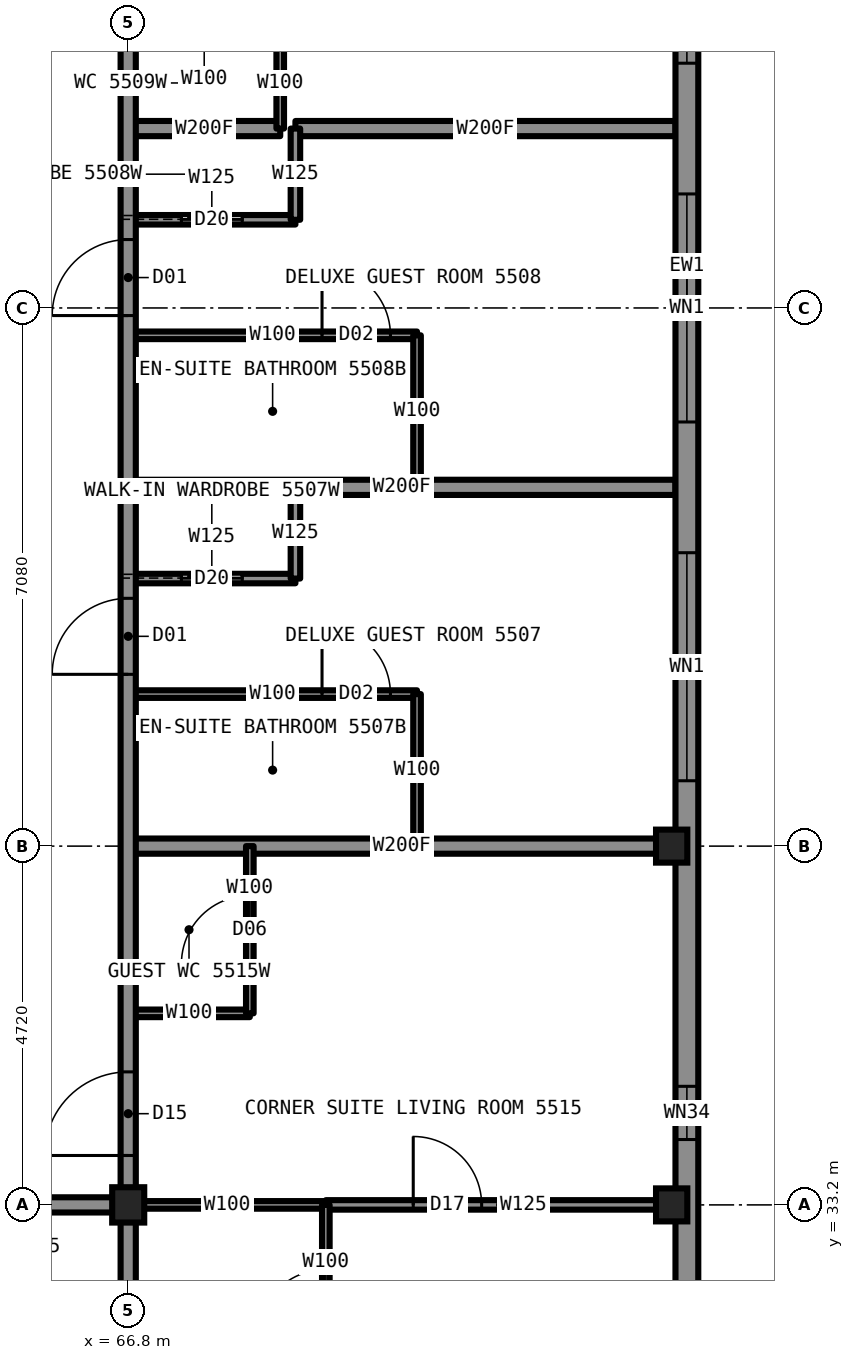
"""IFC4 building model, lengths in metres.
Left out: names, types, materials, properties, quantities, classifications, styles, units other than length and angle.
Written with IfcOpenShell. Run it as: python <this file> out.ifc"""

import sys

from ifc_helpers import new_model, si_unit, direction, frame, frame_2d, origin, origin_2d, place, context, subcontext, project, spatial, rectangle, i_section, extrude, element, fill, save


model = new_model("IFC4")
c1 = context("Model", 3, precision=1e-05, world=origin(), true_north=direction((0.0, 1.0)))
c2 = subcontext(c1, "Body", "Model", "MODEL_VIEW")
j1 = project(units=[si_unit("LENGTHUNIT", "METRE"), si_unit("PLANEANGLEUNIT", "RADIAN")], contexts=[c1])
p1 = place(None, origin())
s1 = spatial("IfcSite", under=j1, at=p1, CompositionType="ELEMENT")
p2 = place(p1, origin())
s2 = spatial("IfcBuilding", under=s1, at=p2, CompositionType="ELEMENT")
p3 = place(p2, frame((0.0, 0.0, 203.8)))
s3 = spatial("IfcBuildingStorey", under=s2, at=p3, CompositionType="ELEMENT", Elevation=203.8)
for number, where, z_axis, x_axis in (
    (1, (73.95, 33.2, 0.0), (0.0, 0.0, 1.0), (1.0, 0.0, 0.0)),
    (2, (73.95, 37.92, 0.0), (0.0, 0.0, 1.0), (1.0, 0.0, 0.0)),
):
    element("IfcColumn", number, at=place(p3, frame(where, z_axis=z_axis, x_axis=x_axis)), inside=s3, PredefinedType="COLUMN", context=c2, shape_type="SweptSolid", body=[
        extrude(i_section(OverallWidth=0.411, OverallDepth=0.434, WebThickness=0.036, FlangeThickness=0.057, at=origin_2d()), origin(), (0.0, 0.0, 1.0), 3.5),
    ])
p4 = place(p3, frame((66.8, 33.2, 0.0), z_axis=(0.0, 0.0, 1.0), x_axis=(1.0, 0.0, 0.0)))
e3 = element("IfcColumn", 3, at=p4, inside=s3, PredefinedType="COLUMN", context=c2, shape_type="SweptSolid", body=[
    extrude(i_section(OverallWidth=0.422, OverallDepth=0.465, WebThickness=0.045, FlangeThickness=0.073, at=origin_2d()), origin(), (0.0, 0.0, 1.0), 3.5),
])
p5 = place(p3, frame((66.8, 44.64, 0.0), z_axis=(0.0, 0.0, 1.0), x_axis=(1.0, 0.0, 0.0)))
e4 = element("IfcWall", 4, at=p5, inside=s3, PredefinedType="PARTITIONING", context=c2, shape_type="SweptSolid", body=[
    extrude(rectangle(XDim=3.8, YDim=0.1, at=frame_2d((1.9, 0.0))), origin(), (0.0, 0.0, 1.0), 3.33),
])
p6 = place(p5, frame((2.55, 0.0, 0.0)))
e5 = element("IfcOpeningElement", 5, at=p6, cuts=e4, PredefinedType="OPENING", context=c2, shape_type="SweptSolid", body=[
    extrude(rectangle(XDim=0.9, YDim=2.1, at=frame_2d((0.45, 1.05))), frame((0.0, 0.06, 0.0), z_axis=(0.0, -1.0, 0.0), x_axis=(1.0, 0.0, 0.0)), (0.0, 0.0, 1.0), 0.12),
])
p7 = place(p3, frame((66.8, 33.2, 0.0), z_axis=(0.0, 0.0, 1.0), x_axis=(1.0, 0.0, 0.0)))
e6 = element("IfcWall", 6, at=p7, inside=s3, PredefinedType="PARTITIONING", context=c2, shape_type="SweptSolid", body=[
    extrude(rectangle(XDim=2.6, YDim=0.1, at=frame_2d((1.3, 0.0))), origin(), (0.0, 0.0, 1.0), 2.573),
])
p8 = place(p3, frame((43.2, 33.2, 0.0), z_axis=(0.0, 0.0, 1.0), x_axis=(1.0, 0.0, 0.0)))
e7 = element("IfcWall", 7, at=p8, inside=s3, PredefinedType="PARTITIONING", context=c2, shape_type="SweptSolid", body=[
    extrude(rectangle(XDim=23.6, YDim=0.2, at=frame_2d((11.8, 0.0))), origin(), (0.0, 0.0, 1.0), 3.33),
])
p9 = place(p8, frame((2.55, 0.0, 0.0)))
e8 = element("IfcOpeningElement", 8, at=p9, cuts=e7, PredefinedType="OPENING", context=c2, shape_type="SweptSolid", body=[
    extrude(rectangle(XDim=1.0, YDim=2.2, at=frame_2d((0.5, 1.1))), frame((0.0, 0.11, 0.0), z_axis=(0.0, -1.0, 0.0), x_axis=(1.0, 0.0, 0.0)), (0.0, 0.0, 1.0), 0.22),
])
p10 = place(p8, frame((6.57, 0.0, 0.0)))
e9 = element("IfcOpeningElement", 9, at=p10, cuts=e7, PredefinedType="OPENING", context=c2, shape_type="SweptSolid", body=[
    extrude(rectangle(XDim=1.1, YDim=2.2, at=frame_2d((0.55, 1.1))), frame((0.0, 0.11, 0.0), z_axis=(0.0, -1.0, 0.0), x_axis=(1.0, 0.0, 0.0)), (0.0, 0.0, 1.0), 0.22),
])
p11 = place(p8, frame((21.14, 0.0, 0.0)))
e10 = element("IfcOpeningElement", 10, at=p11, cuts=e7, PredefinedType="OPENING", context=c2, shape_type="SweptSolid", body=[
    extrude(rectangle(XDim=1.0, YDim=2.2, at=frame_2d((0.5, 1.1))), frame((0.0, 0.11, 0.0), z_axis=(0.0, -1.0, 0.0), x_axis=(1.0, 0.0, 0.0)), (0.0, 0.0, 1.0), 0.22),
])
p12 = place(p3, frame((69.4, 33.2, 0.0), z_axis=(0.0, 0.0, 1.0), x_axis=(1.0, 0.0, 0.0)))
e11 = element("IfcWall", 11, at=p12, inside=s3, PredefinedType="PARTITIONING", context=c2, shape_type="SweptSolid", body=[
    extrude(rectangle(XDim=4.6, YDim=0.125, at=frame_2d((2.3, 0.0))), origin(), (0.0, 0.0, 1.0), 2.573),
])
p13 = place(p12, frame((1.15, 0.0, 0.0)))
e12 = element("IfcOpeningElement", 12, at=p13, cuts=e11, PredefinedType="OPENING", context=c2, shape_type="SweptSolid", body=[
    extrude(rectangle(XDim=0.9, YDim=2.2, at=frame_2d((0.45, 1.1))), frame((0.0, 0.073, 0.0), z_axis=(0.0, -1.0, 0.0), x_axis=(1.0, 0.0, 0.0)), (0.0, 0.0, 1.0), 0.145),
])
p14 = place(p3, frame((66.8, 42.64, 0.0), z_axis=(0.0, 0.0, 1.0), x_axis=(1.0, 0.0, 0.0)))
e13 = element("IfcWall", 13, at=p14, inside=s3, PredefinedType="PARTITIONING", context=c2, shape_type="SweptSolid", body=[
    extrude(rectangle(XDim=7.2, YDim=0.2, at=frame_2d((3.6, 0.0))), origin(), (0.0, 0.0, 1.0), 2.73),
])
p15 = place(p3, frame((66.8, 41.44, 0.0), z_axis=(0.0, 0.0, 1.0), x_axis=(1.0, 0.0, 0.0)))
e14 = element("IfcWall", 14, at=p15, inside=s3, PredefinedType="PARTITIONING", context=c2, shape_type="SweptSolid", body=[
    extrude(rectangle(XDim=2.2, YDim=0.125, at=frame_2d((1.1, 0.0))), origin(), (0.0, 0.0, 1.0), 3.33),
])
p16 = place(p15, frame((0.7, 0.0, 0.0)))
e15 = element("IfcOpeningElement", 15, at=p16, cuts=e14, PredefinedType="OPENING", context=c2, shape_type="SweptSolid", body=[
    extrude(rectangle(XDim=0.8, YDim=2.1, at=frame_2d((0.4, 1.05))), frame((0.0, 0.073, 0.0), z_axis=(0.0, -1.0, 0.0), x_axis=(1.0, 0.0, 0.0)), (0.0, 0.0, 1.0), 0.145),
])
p17 = place(p3, frame((66.8, 39.92, 0.0), z_axis=(0.0, 0.0, 1.0), x_axis=(1.0, 0.0, 0.0)))
e16 = element("IfcWall", 16, at=p17, inside=s3, PredefinedType="PARTITIONING", context=c2, shape_type="SweptSolid", body=[
    extrude(rectangle(XDim=3.8, YDim=0.1, at=frame_2d((1.9, 0.0))), origin(), (0.0, 0.0, 1.0), 3.33),
])
p18 = place(p17, frame((2.55, 0.0, 0.0)))
e17 = element("IfcOpeningElement", 17, at=p18, cuts=e16, PredefinedType="OPENING", context=c2, shape_type="SweptSolid", body=[
    extrude(rectangle(XDim=0.9, YDim=2.1, at=frame_2d((0.45, 1.05))), frame((0.0, 0.06, 0.0), z_axis=(0.0, -1.0, 0.0), x_axis=(1.0, 0.0, 0.0)), (0.0, 0.0, 1.0), 0.12),
])
p19 = place(p3, frame((66.8, 37.92, 0.0), z_axis=(0.0, 0.0, 1.0), x_axis=(1.0, 0.0, 0.0)))
e18 = element("IfcWall", 18, at=p19, inside=s3, PredefinedType="PARTITIONING", context=c2, shape_type="SweptSolid", body=[
    extrude(rectangle(XDim=7.2, YDim=0.2, at=frame_2d((3.6, 0.0))), origin(), (0.0, 0.0, 1.0), 2.573),
])
p20 = place(p3, frame((66.8, 35.72, 0.0), z_axis=(0.0, 0.0, 1.0), x_axis=(1.0, 0.0, 0.0)))
e19 = element("IfcWall", 19, at=p20, inside=s3, PredefinedType="PARTITIONING", context=c2, shape_type="SweptSolid", body=[
    extrude(rectangle(XDim=1.6, YDim=0.1, at=frame_2d((0.8, 0.0))), origin(), (0.0, 0.0, 1.0), 3.33),
])
p21 = place(p3, frame((66.8, 46.16, 0.0), z_axis=(0.0, 0.0, 1.0), x_axis=(1.0, 0.0, 0.0)))
e20 = element("IfcWall", 20, at=p21, inside=s3, PredefinedType="PARTITIONING", context=c2, shape_type="SweptSolid", body=[
    extrude(rectangle(XDim=2.2, YDim=0.125, at=frame_2d((1.1, 0.0))), origin(), (0.0, 0.0, 1.0), 3.33),
])
p22 = place(p21, frame((0.7, 0.0, 0.0)))
e21 = element("IfcOpeningElement", 21, at=p22, cuts=e20, PredefinedType="OPENING", context=c2, shape_type="SweptSolid", body=[
    extrude(rectangle(XDim=0.8, YDim=2.1, at=frame_2d((0.4, 1.05))), frame((0.0, 0.073, 0.0), z_axis=(0.0, -1.0, 0.0), x_axis=(1.0, 0.0, 0.0)), (0.0, 0.0, 1.0), 0.145),
])
p23 = place(p3, frame((66.8, 47.36, 0.0), z_axis=(0.0, 0.0, 1.0), x_axis=(1.0, 0.0, 0.0)))
e22 = element("IfcWall", 22, at=p23, inside=s3, PredefinedType="PARTITIONING", context=c2, shape_type="SweptSolid", body=[
    extrude(rectangle(XDim=2.0, YDim=0.2, at=frame_2d((1.0, 0.0))), origin(), (0.0, 0.0, 1.0), 2.73),
])
p24 = place(p3, frame((69.0, 47.36, 0.0), z_axis=(0.0, 0.0, 1.0), x_axis=(1.0, 0.0, 0.0)))
e23 = element("IfcWall", 23, at=p24, inside=s3, PredefinedType="PARTITIONING", context=c2, shape_type="SweptSolid", body=[
    extrude(rectangle(XDim=5.0, YDim=0.2, at=frame_2d((2.5, 0.0))), origin(), (0.0, 0.0, 1.0), 2.73),
])
p25 = place(p3, frame((66.8, 33.2, 0.0), z_axis=(0.0, 0.0, 1.0), x_axis=(0.0, 1.0, 0.0)))
e24 = element("IfcWall", 24, at=p25, inside=s3, PredefinedType="PARTITIONING", context=c2, shape_type="SweptSolid", body=[
    extrude(rectangle(XDim=23.58, YDim=0.2, at=frame_2d((11.79, 0.0))), origin(), (0.0, 0.0, 1.0), 3.33),
])
p26 = place(p25, frame((6.98, 0.0, 0.0)))
e25 = element("IfcOpeningElement", 25, at=p26, cuts=e24, PredefinedType="OPENING", context=c2, shape_type="SweptSolid", body=[
    extrude(rectangle(XDim=1.0, YDim=2.2, at=frame_2d((0.5, 1.1))), frame((0.0, 0.11, 0.0), z_axis=(0.0, -1.0, 0.0), x_axis=(1.0, 0.0, 0.0)), (0.0, 0.0, 1.0), 0.22),
])
p27 = place(p25, frame((11.7, 0.0, 0.0)))
e26 = element("IfcOpeningElement", 26, at=p27, cuts=e24, PredefinedType="OPENING", context=c2, shape_type="SweptSolid", body=[
    extrude(rectangle(XDim=1.0, YDim=2.2, at=frame_2d((0.5, 1.1))), frame((0.0, 0.11, 0.0), z_axis=(0.0, -1.0, 0.0), x_axis=(1.0, 0.0, 0.0)), (0.0, 0.0, 1.0), 0.22),
])
p28 = place(p25, frame((15.62, 0.0, 0.0)))
e27 = element("IfcOpeningElement", 27, at=p28, cuts=e24, PredefinedType="OPENING", context=c2, shape_type="SweptSolid", body=[
    extrude(rectangle(XDim=1.0, YDim=2.2, at=frame_2d((0.5, 1.1))), frame((0.0, 0.11, 0.0), z_axis=(0.0, -1.0, 0.0), x_axis=(1.0, 0.0, 0.0)), (0.0, 0.0, 1.0), 0.22),
])
p29 = place(p25, frame((22.05, 0.0, 0.0)))
e28 = element("IfcOpeningElement", 28, at=p29, cuts=e24, PredefinedType="OPENING", context=c2, shape_type="SweptSolid", body=[
    extrude(rectangle(XDim=1.1, YDim=2.2, at=frame_2d((0.55, 1.1))), frame((0.0, 0.11, 0.0), z_axis=(0.0, -1.0, 0.0), x_axis=(1.0, 0.0, 0.0)), (0.0, 0.0, 1.0), 0.22),
])
p30 = place(p25, frame((0.65, 0.0, 0.0)))
e29 = element("IfcOpeningElement", 29, at=p30, cuts=e24, PredefinedType="OPENING", context=c2, shape_type="SweptSolid", body=[
    extrude(rectangle(XDim=1.1, YDim=2.2, at=frame_2d((0.55, 1.1))), frame((0.0, 0.11, 0.0), z_axis=(0.0, -1.0, 0.0), x_axis=(1.0, 0.0, 0.0)), (0.0, 0.0, 1.0), 0.22),
])
p31 = place(p3, frame((66.8, 26.0, 0.0), z_axis=(0.0, 0.0, 1.0), x_axis=(0.0, 1.0, 0.0)))
e30 = element("IfcWall", 30, at=p31, inside=s3, PredefinedType="PARTITIONING", context=c2, shape_type="SweptSolid", body=[
    extrude(rectangle(XDim=7.2, YDim=0.2, at=frame_2d((3.6, 0.0))), origin(), (0.0, 0.0, 1.0), 2.573),
])
p32 = place(p3, frame((68.4, 35.72, 0.0), z_axis=(0.0, 0.0, 1.0), x_axis=(0.0, 1.0, 0.0)))
e31 = element("IfcWall", 31, at=p32, inside=s3, PredefinedType="PARTITIONING", context=c2, shape_type="SweptSolid", body=[
    extrude(rectangle(XDim=2.2, YDim=0.1, at=frame_2d((1.1, 0.0))), origin(), (0.0, 0.0, 1.0), 3.33),
])
p33 = place(p32, frame((0.65, 0.0, 0.0)))
e32 = element("IfcOpeningElement", 32, at=p33, cuts=e31, PredefinedType="OPENING", context=c2, shape_type="SweptSolid", body=[
    extrude(rectangle(XDim=0.9, YDim=2.1, at=frame_2d((0.45, 1.05))), frame((0.0, 0.06, 0.0), z_axis=(0.0, -1.0, 0.0), x_axis=(1.0, 0.0, 0.0)), (0.0, 0.0, 1.0), 0.12),
])
p34 = place(p3, frame((68.8, 47.36, 0.0), z_axis=(0.0, 0.0, 1.0), x_axis=(0.0, 1.0, 0.0)))
e33 = element("IfcWall", 33, at=p34, inside=s3, PredefinedType="PARTITIONING", context=c2, shape_type="SweptSolid", body=[
    extrude(rectangle(XDim=1.2, YDim=0.1, at=frame_2d((0.6, 0.0))), origin(), (0.0, 0.0, 1.0), 3.33),
])
p35 = place(p3, frame((69.0, 41.44, 0.0), z_axis=(0.0, 0.0, 1.0), x_axis=(0.0, 1.0, 0.0)))
e34 = element("IfcWall", 34, at=p35, inside=s3, PredefinedType="PARTITIONING", context=c2, shape_type="SweptSolid", body=[
    extrude(rectangle(XDim=1.2, YDim=0.125, at=frame_2d((0.6, 0.0))), origin(), (0.0, 0.0, 1.0), 3.33),
])
p36 = place(p3, frame((69.0, 46.16, 0.0), z_axis=(0.0, 0.0, 1.0), x_axis=(0.0, 1.0, 0.0)))
e35 = element("IfcWall", 35, at=p36, inside=s3, PredefinedType="PARTITIONING", context=c2, shape_type="SweptSolid", body=[
    extrude(rectangle(XDim=1.2, YDim=0.125, at=frame_2d((0.6, 0.0))), origin(), (0.0, 0.0, 1.0), 3.33),
])
p37 = place(p3, frame((69.4, 30.6, 0.0), z_axis=(0.0, 0.0, 1.0), x_axis=(0.0, 1.0, 0.0)))
e36 = element("IfcWall", 36, at=p37, inside=s3, PredefinedType="PARTITIONING", context=c2, shape_type="SweptSolid", body=[
    extrude(rectangle(XDim=2.6, YDim=0.1, at=frame_2d((1.3, 0.0))), origin(), (0.0, 0.0, 1.0), 3.33),
])
p38 = place(p37, frame((0.85, 0.0, 0.0)))
e37 = element("IfcOpeningElement", 37, at=p38, cuts=e36, PredefinedType="OPENING", context=c2, shape_type="SweptSolid", body=[
    extrude(rectangle(XDim=0.9, YDim=2.1, at=frame_2d((0.45, 1.05))), frame((0.0, 0.06, 0.0), z_axis=(0.0, -1.0, 0.0), x_axis=(1.0, 0.0, 0.0)), (0.0, 0.0, 1.0), 0.12),
])
for number, where, z_axis, x_axis in (
    (38, (70.6, 37.92, 0.0), (0.0, 0.0, 1.0), (0.0, 1.0, 0.0)),
    (39, (70.6, 42.64, 0.0), (0.0, 0.0, 1.0), (0.0, 1.0, 0.0)),
):
    element("IfcWall", number, at=place(p3, frame(where, z_axis=z_axis, x_axis=x_axis)), inside=s3, PredefinedType="PARTITIONING", context=c2, shape_type="SweptSolid", body=[
        extrude(rectangle(XDim=2.0, YDim=0.1, at=frame_2d((1.0, 0.0))), origin(), (0.0, 0.0, 1.0), 3.33),
    ])
p39 = place(p3, frame((74.15, 31.2, 0.0), z_axis=(0.0, 0.0, 1.0), x_axis=(0.0, 1.0, 0.0)))
e40 = element("IfcWall", 40, at=p39, inside=s3, PredefinedType="SOLIDWALL", context=c2, shape_type="SweptSolid", body=[
    extrude(rectangle(XDim=27.6, YDim=0.3, at=frame_2d((13.8, 0.0))), origin(), (0.0, 0.0, 1.0), 2.83),
])
p40 = place(p39, frame((2.86, 0.0, 0.3)))
e41 = element("IfcOpeningElement", 41, at=p40, cuts=e40, PredefinedType="OPENING", context=c2, shape_type="SweptSolid", body=[
    extrude(rectangle(XDim=0.7, YDim=1.2, at=frame_2d((0.35, 0.6))), frame((0.0, 0.16, 0.0), z_axis=(0.0, -1.0, 0.0), x_axis=(1.0, 0.0, 0.0)), (0.0, 0.0, 1.0), 0.32),
])
p41 = place(p39, frame((7.58, 0.0, 0.3)))
e42 = element("IfcOpeningElement", 42, at=p41, cuts=e40, PredefinedType="OPENING", context=c2, shape_type="SweptSolid", body=[
    extrude(rectangle(XDim=3.0, YDim=2.0, at=frame_2d((1.5, 1.0))), frame((0.0, 0.16, 0.0), z_axis=(0.0, -1.0, 0.0), x_axis=(1.0, 0.0, 0.0)), (0.0, 0.0, 1.0), 0.32),
])
p42 = place(p39, frame((12.3, 0.0, 0.3)))
e43 = element("IfcOpeningElement", 43, at=p42, cuts=e40, PredefinedType="OPENING", context=c2, shape_type="SweptSolid", body=[
    extrude(rectangle(XDim=3.0, YDim=2.0, at=frame_2d((1.5, 1.0))), frame((0.0, 0.16, 0.0), z_axis=(0.0, -1.0, 0.0), x_axis=(1.0, 0.0, 0.0)), (0.0, 0.0, 1.0), 0.32),
])
p43 = place(p39, frame((17.02, 0.0, 0.3)))
e44 = element("IfcOpeningElement", 44, at=p43, cuts=e40, PredefinedType="OPENING", context=c2, shape_type="SweptSolid", body=[
    extrude(rectangle(XDim=3.0, YDim=2.0, at=frame_2d((1.5, 1.0))), frame((0.0, 0.16, 0.0), z_axis=(0.0, -1.0, 0.0), x_axis=(1.0, 0.0, 0.0)), (0.0, 0.0, 1.0), 0.32),
])
p44 = place(p39, frame((23.99, 0.0, 0.3)))
e45 = element("IfcOpeningElement", 45, at=p44, cuts=e40, PredefinedType="OPENING", context=c2, shape_type="SweptSolid", body=[
    extrude(rectangle(XDim=0.7, YDim=1.2, at=frame_2d((0.35, 0.6))), frame((0.0, 0.16, 0.0), z_axis=(0.0, -1.0, 0.0), x_axis=(1.0, 0.0, 0.0)), (0.0, 0.0, 1.0), 0.32),
])
p45 = place(p26, origin())
e46 = element("IfcDoor", 46, at=p45, inside=s3, OperationType="SINGLE_SWING_LEFT", PredefinedType="DOOR", context=c2, shape_type="SweptSolid", body=[
    extrude(rectangle(XDim=1.0, YDim=2.2, at=frame_2d((0.5, 1.1))), frame((0.0, 0.025, 0.0), z_axis=(0.0, -1.0, 0.0), x_axis=(1.0, 0.0, 0.0)), (0.0, 0.0, 1.0), 0.05),
])
fill(e25, e46)
p46 = place(p18, origin())
e47 = element("IfcDoor", 47, at=p46, inside=s3, OperationType="SINGLE_SWING_RIGHT", PredefinedType="DOOR", context=c2, shape_type="SweptSolid", body=[
    extrude(rectangle(XDim=0.9, YDim=2.1, at=frame_2d((0.45, 1.05))), frame((0.0, 0.025, 0.0), z_axis=(0.0, -1.0, 0.0), x_axis=(1.0, 0.0, 0.0)), (0.0, 0.0, 1.0), 0.05),
])
fill(e17, e47)
p47 = place(p16, origin())
e48 = element("IfcDoor", 48, at=p47, inside=s3, OperationType="SLIDING_TO_LEFT", PredefinedType="DOOR", context=c2, shape_type="SweptSolid", body=[
    extrude(rectangle(XDim=0.8, YDim=2.1, at=frame_2d((0.4, 1.05))), frame((0.0, 0.025, 0.0), z_axis=(0.0, -1.0, 0.0), x_axis=(1.0, 0.0, 0.0)), (0.0, 0.0, 1.0), 0.05),
])
fill(e15, e48)
p48 = place(p27, origin())
e49 = element("IfcDoor", 49, at=p48, inside=s3, OperationType="SINGLE_SWING_LEFT", PredefinedType="DOOR", context=c2, shape_type="SweptSolid", body=[
    extrude(rectangle(XDim=1.0, YDim=2.2, at=frame_2d((0.5, 1.1))), frame((0.0, 0.025, 0.0), z_axis=(0.0, -1.0, 0.0), x_axis=(1.0, 0.0, 0.0)), (0.0, 0.0, 1.0), 0.05),
])
fill(e26, e49)
p49 = place(p6, origin())
e50 = element("IfcDoor", 50, at=p49, inside=s3, OperationType="SINGLE_SWING_RIGHT", PredefinedType="DOOR", context=c2, shape_type="SweptSolid", body=[
    extrude(rectangle(XDim=0.9, YDim=2.1, at=frame_2d((0.45, 1.05))), frame((0.0, 0.025, 0.0), z_axis=(0.0, -1.0, 0.0), x_axis=(1.0, 0.0, 0.0)), (0.0, 0.0, 1.0), 0.05),
])
fill(e5, e50)
p50 = place(p22, origin())
e51 = element("IfcDoor", 51, at=p50, inside=s3, OperationType="SLIDING_TO_LEFT", PredefinedType="DOOR", context=c2, shape_type="SweptSolid", body=[
    extrude(rectangle(XDim=0.8, YDim=2.1, at=frame_2d((0.4, 1.05))), frame((0.0, 0.025, 0.0), z_axis=(0.0, -1.0, 0.0), x_axis=(1.0, 0.0, 0.0)), (0.0, 0.0, 1.0), 0.05),
])
fill(e21, e51)
p51 = place(p30, origin())
e52 = element("IfcDoor", 52, at=p51, inside=s3, OperationType="SINGLE_SWING_LEFT", PredefinedType="DOOR", context=c2, shape_type="SweptSolid", body=[
    extrude(rectangle(XDim=1.1, YDim=2.2, at=frame_2d((0.55, 1.1))), frame((0.0, 0.025, 0.0), z_axis=(0.0, -1.0, 0.0), x_axis=(1.0, 0.0, 0.0)), (0.0, 0.0, 1.0), 0.05),
])
fill(e29, e52)
p52 = place(p38, origin())
e53 = element("IfcDoor", 53, at=p52, inside=s3, OperationType="SINGLE_SWING_RIGHT", PredefinedType="DOOR", context=c2, shape_type="SweptSolid", body=[
    extrude(rectangle(XDim=0.9, YDim=2.1, at=frame_2d((0.45, 1.05))), frame((0.0, 0.025, 0.0), z_axis=(0.0, -1.0, 0.0), x_axis=(1.0, 0.0, 0.0)), (0.0, 0.0, 1.0), 0.05),
])
fill(e37, e53)
p53 = place(p13, origin())
e54 = element("IfcDoor", 54, at=p53, inside=s3, OperationType="SINGLE_SWING_LEFT", PredefinedType="DOOR", context=c2, shape_type="SweptSolid", body=[
    extrude(rectangle(XDim=0.9, YDim=2.2, at=frame_2d((0.45, 1.1))), frame((0.0, 0.025, 0.0), z_axis=(0.0, -1.0, 0.0), x_axis=(1.0, 0.0, 0.0)), (0.0, 0.0, 1.0), 0.05),
])
fill(e12, e54)
p54 = place(p33, origin())
e55 = element("IfcDoor", 55, at=p54, inside=s3, OperationType="SINGLE_SWING_LEFT", PredefinedType="DOOR", context=c2, shape_type="SweptSolid", body=[
    extrude(rectangle(XDim=0.9, YDim=2.1, at=frame_2d((0.45, 1.05))), frame((0.0, 0.025, 0.0), z_axis=(0.0, -1.0, 0.0), x_axis=(1.0, 0.0, 0.0)), (0.0, 0.0, 1.0), 0.05),
])
fill(e32, e55)
p55 = place(p40, origin())
e56 = element("IfcWindow", 56, at=p55, inside=s3, PartitioningType="SINGLE_PANEL", PredefinedType="WINDOW", context=c2, shape_type="SweptSolid", body=[
    extrude(rectangle(XDim=0.7, YDim=1.2, at=frame_2d((0.35, 0.6))), frame((0.0, 0.13, 0.0), z_axis=(0.0, -1.0, 0.0), x_axis=(1.0, 0.0, 0.0)), (0.0, 0.0, 1.0), 0.06),
])
fill(e41, e56)
p56 = place(p41, origin())
e57 = element("IfcWindow", 57, at=p56, inside=s3, PartitioningType="SINGLE_PANEL", PredefinedType="WINDOW", context=c2, shape_type="SweptSolid", body=[
    extrude(rectangle(XDim=3.0, YDim=2.0, at=frame_2d((1.5, 1.0))), frame((0.0, 0.13, 0.0), z_axis=(0.0, -1.0, 0.0), x_axis=(1.0, 0.0, 0.0)), (0.0, 0.0, 1.0), 0.06),
])
fill(e42, e57)
p57 = place(p42, origin())
e58 = element("IfcWindow", 58, at=p57, inside=s3, PartitioningType="SINGLE_PANEL", PredefinedType="WINDOW", context=c2, shape_type="SweptSolid", body=[
    extrude(rectangle(XDim=3.0, YDim=2.0, at=frame_2d((1.5, 1.0))), frame((0.0, 0.13, 0.0), z_axis=(0.0, -1.0, 0.0), x_axis=(1.0, 0.0, 0.0)), (0.0, 0.0, 1.0), 0.06),
])
fill(e43, e58)
p58 = place(p43, origin())
e59 = element("IfcWindow", 59, at=p58, inside=s3, PartitioningType="SINGLE_PANEL", PredefinedType="WINDOW", context=c2, shape_type="SweptSolid", body=[
    extrude(rectangle(XDim=3.0, YDim=2.0, at=frame_2d((1.5, 1.0))), frame((0.0, 0.13, 0.0), z_axis=(0.0, -1.0, 0.0), x_axis=(1.0, 0.0, 0.0)), (0.0, 0.0, 1.0), 0.06),
])
fill(e44, e59)
save(model, sys.argv[1])
